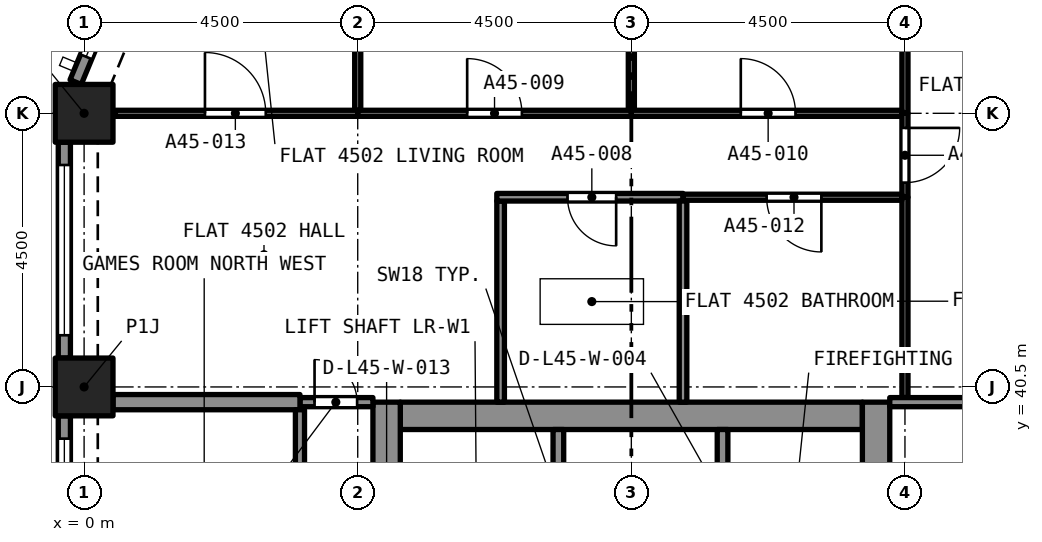
"""IFC4 building model, lengths in metres.
Left out: names, types, materials, properties, quantities, classifications, styles, units other than length and angle.
Written with IfcOpenShell. Run it as: python <this file> out.ifc"""

import sys

from ifc_helpers import new_model, si_unit, direction, frame, frame_2d, origin, origin_2d, place, context, subcontext, project, spatial, rectangle, extrude, element, fill, save


model = new_model("IFC4")
c1 = context("Model", 3, precision=1e-05, world=origin(), true_north=direction((0.0, 1.0)))
c2 = subcontext(c1, "Body", "Model", "MODEL_VIEW")
j1 = project(units=[si_unit("LENGTHUNIT", "METRE"), si_unit("PLANEANGLEUNIT", "RADIAN")], contexts=[c1])
p1 = place(None, origin())
s1 = spatial("IfcSite", under=j1, at=p1, CompositionType="ELEMENT")
p2 = place(p1, origin())
s2 = spatial("IfcBuilding", under=s1, at=p2, CompositionType="ELEMENT")
p3 = place(p2, frame((0.0, 0.0, 163.8)))
s3 = spatial("IfcBuildingStorey", under=s2, at=p3, CompositionType="ELEMENT", Elevation=163.8)
for number, where, z_axis, x_axis in (
    (1, (0.0, 40.5, 0.0), (0.0, 0.0, 1.0), (1.0, 0.0, 0.0)),
    (2, (0.0, 45.0, 0.0), (0.0, 0.0, 1.0), (1.0, 0.0, 0.0)),
):
    element("IfcColumn", number, at=place(p3, frame(where, z_axis=z_axis, x_axis=x_axis)), inside=s3, PredefinedType="COLUMN", context=c2, shape_type="SweptSolid", body=[
        extrude(rectangle(XDim=0.95, YDim=0.95, at=origin_2d()), origin(), (0.0, 0.0, 1.0), 4.4),
    ])
p4 = place(p3, frame((5.2, 40.025, 0.0), z_axis=(0.0, 0.0, 1.0), x_axis=(1.0, 0.0, 0.0)))
e3 = element("IfcWall", 3, at=p4, inside=s3, PredefinedType="SOLIDWALL", context=c2, shape_type="SweptSolid", body=[
    extrude(rectangle(XDim=7.6, YDim=0.45, at=frame_2d((3.8, 0.0))), origin(), (0.0, 0.0, 1.0), 4.4),
])
p5 = place(p3, frame((4.975, 27.25, 0.0), z_axis=(0.0, 0.0, 1.0), x_axis=(0.0, 1.0, 0.0)))
e4 = element("IfcWall", 4, at=p5, inside=s3, PredefinedType="SOLIDWALL", context=c2, shape_type="SweptSolid", body=[
    extrude(rectangle(XDim=13.0, YDim=0.45, at=frame_2d((6.5, 0.0))), origin(), (0.0, 0.0, 1.0), 4.4),
])
p6 = place(p5, frame((8.7, 0.0, 0.0)))
e5 = element("IfcOpeningElement", 5, at=p6, cuts=e4, PredefinedType="OPENING", context=c2, shape_type="SweptSolid", body=[
    extrude(rectangle(XDim=1.2, YDim=2.1, at=frame_2d((0.6, 1.05))), frame((0.0, 0.235, 0.0), z_axis=(0.0, -1.0, 0.0), x_axis=(1.0, 0.0, 0.0)), (0.0, 0.0, 1.0), 0.47),
])
p7 = place(p3, frame((13.025, 27.25, 0.0), z_axis=(0.0, 0.0, 1.0), x_axis=(0.0, 1.0, 0.0)))
e6 = element("IfcWall", 6, at=p7, inside=s3, PredefinedType="SOLIDWALL", context=c2, shape_type="SweptSolid", body=[
    extrude(rectangle(XDim=13.0, YDim=0.45, at=frame_2d((6.5, 0.0))), origin(), (0.0, 0.0, 1.0), 4.4),
])
p8 = place(p7, frame((10.85, 0.0, 0.0)))
e7 = element("IfcOpeningElement", 7, at=p8, cuts=e6, PredefinedType="OPENING", context=c2, shape_type="SweptSolid", body=[
    extrude(rectangle(XDim=1.1, YDim=2.1, at=frame_2d((0.55, 1.05))), frame((0.0, 0.235, 0.0), z_axis=(0.0, -1.0, 0.0), x_axis=(1.0, 0.0, 0.0)), (0.0, 0.0, 1.0), 0.47),
])
p9 = place(p7, frame((8.7, 0.0, 0.0)))
e8 = element("IfcOpeningElement", 8, at=p9, cuts=e6, PredefinedType="OPENING", context=c2, shape_type="SweptSolid", body=[
    extrude(rectangle(XDim=1.2, YDim=2.1, at=frame_2d((0.6, 1.05))), frame((0.0, 0.235, 0.0), z_axis=(0.0, -1.0, 0.0), x_axis=(1.0, 0.0, 0.0)), (0.0, 0.0, 1.0), 0.47),
])
p10 = place(p3, frame((-0.139, 45.513, 0.0), z_axis=(0.0, 0.0, 1.0), x_axis=(0.382680855588, 0.923880599843, 0.0)))
e9 = element("IfcWall", 9, at=p10, inside=s3, PredefinedType="SOLIDWALL", context=c2, shape_type="SweptSolid", body=[
    extrude(rectangle(XDim=2.403, YDim=0.2, at=frame_2d((1.201, 0.0))), origin(), (0.0, 0.0, 1.0), 4.4),
])
p11 = place(p10, frame((0.451, 0.0, 0.45)))
e10 = element("IfcOpeningElement", 10, at=p11, cuts=e9, PredefinedType="OPENING", context=c2, shape_type="SweptSolid", body=[
    extrude(rectangle(XDim=1.7, YDim=2.55, at=frame_2d((0.85, 1.275))), frame((0.0, 0.11, 0.0), z_axis=(0.0, -1.0, 0.0), x_axis=(1.0, 0.0, 0.0)), (0.0, 0.0, 1.0), 0.22),
])
p12 = place(p3, frame((-0.325, 40.975, 0.0), z_axis=(0.0, 0.0, 1.0), x_axis=(0.0, 1.0, 0.0)))
e11 = element("IfcWall", 11, at=p12, inside=s3, PredefinedType="SOLIDWALL", context=c2, shape_type="SweptSolid", body=[
    extrude(rectangle(XDim=3.55, YDim=0.2, at=frame_2d((1.775, 0.0))), origin(), (0.0, 0.0, 1.0), 4.4),
])
p13 = place(p12, frame((0.375, 0.0, 0.45)))
e12 = element("IfcOpeningElement", 12, at=p13, cuts=e11, PredefinedType="OPENING", context=c2, shape_type="SweptSolid", body=[
    extrude(rectangle(XDim=2.8, YDim=2.55, at=frame_2d((1.4, 1.275))), frame((0.0, 0.11, 0.0), z_axis=(0.0, -1.0, 0.0), x_axis=(1.0, 0.0, 0.0)), (0.0, 0.0, 1.0), 0.22),
])
p14 = place(p3, frame((-0.325, 36.475, 0.0), z_axis=(0.0, 0.0, 1.0), x_axis=(0.0, 1.0, 0.0)))
e13 = element("IfcWall", 13, at=p14, inside=s3, PredefinedType="SOLIDWALL", context=c2, shape_type="SweptSolid", body=[
    extrude(rectangle(XDim=3.55, YDim=0.2, at=frame_2d((1.775, 0.0))), origin(), (0.0, 0.0, 1.0), 4.4),
])
p15 = place(p14, frame((0.375, 0.0, 0.45)))
e14 = element("IfcOpeningElement", 14, at=p15, cuts=e13, PredefinedType="OPENING", context=c2, shape_type="SweptSolid", body=[
    extrude(rectangle(XDim=2.8, YDim=2.55, at=frame_2d((1.4, 1.275))), frame((0.0, 0.11, 0.0), z_axis=(0.0, -1.0, 0.0), x_axis=(1.0, 0.0, 0.0)), (0.0, 0.0, 1.0), 0.22),
])
p16 = place(p3, frame((6.85, 40.25, 0.0), z_axis=(0.0, 0.0, 1.0), x_axis=(0.0, 1.0, 0.0)))
e15 = element("IfcWall", 15, at=p16, inside=s3, PredefinedType="PARTITIONING", context=c2, shape_type="SweptSolid", body=[
    extrude(rectangle(XDim=3.308, YDim=0.125, at=frame_2d((1.654, 0.0))), origin(), (0.0, 0.0, 1.0), 4.1),
])
p17 = place(p3, frame((9.85, 43.62, 0.0), z_axis=(0.0, 0.0, 1.0), x_axis=(-1.0, 0.0, 0.0)))
e16 = element("IfcWall", 16, at=p17, inside=s3, PredefinedType="PARTITIONING", context=c2, shape_type="SweptSolid", body=[
    extrude(rectangle(XDim=3.063, YDim=0.125, at=frame_2d((1.531, 0.0))), origin(), (0.0, 0.0, 1.0), 4.1),
])
p18 = place(p17, frame((1.1, 0.0, 0.0)))
e17 = element("IfcOpeningElement", 17, at=p18, cuts=e16, PredefinedType="OPENING", context=c2, shape_type="SweptSolid", body=[
    extrude(rectangle(XDim=0.8, YDim=2.1, at=frame_2d((0.4, 1.05))), frame((0.0, 0.073, 0.0), z_axis=(0.0, -1.0, 0.0), x_axis=(1.0, 0.0, 0.0)), (0.0, 0.0, 1.0), 0.145),
])
p19 = place(p3, frame((9.85, 40.25, 0.0), z_axis=(0.0, 0.0, 1.0), x_axis=(0.0, 1.0, 0.0)))
e18 = element("IfcWall", 18, at=p19, inside=s3, PredefinedType="PARTITIONING", context=c2, shape_type="SweptSolid", body=[
    extrude(rectangle(XDim=3.308, YDim=0.125, at=frame_2d((1.654, 0.0))), origin(), (0.0, 0.0, 1.0), 4.1),
])
p20 = place(p3, frame((9.0, 45.05, 0.0), z_axis=(0.0, 0.0, 1.0), x_axis=(0.0, 1.0, 0.0)))
e19 = element("IfcWall", 19, at=p20, inside=s3, PredefinedType="PARTITIONING", context=c2, shape_type="SweptSolid", body=[
    extrude(rectangle(XDim=3.975, YDim=0.1, at=frame_2d((1.987, 0.0))), origin(), (0.0, 0.0, 1.0), 4.1),
])
p21 = place(p3, frame((4.5, 45.0, 0.0), z_axis=(0.0, 0.0, 1.0), x_axis=(1.0, 0.0, 0.0)))
e20 = element("IfcWall", 20, at=p21, inside=s3, PredefinedType="PARTITIONING", context=c2, shape_type="SweptSolid", body=[
    extrude(rectangle(XDim=4.5, YDim=0.1, at=frame_2d((2.25, 0.0))), origin(), (0.0, 0.0, 1.0), 4.1),
])
p22 = place(p21, frame((1.8, 0.0, 0.0)))
e21 = element("IfcOpeningElement", 21, at=p22, cuts=e20, PredefinedType="OPENING", context=c2, shape_type="SweptSolid", body=[
    extrude(rectangle(XDim=0.9, YDim=2.1, at=frame_2d((0.45, 1.05))), frame((0.0, 0.06, 0.0), z_axis=(0.0, -1.0, 0.0), x_axis=(1.0, 0.0, 0.0)), (0.0, 0.0, 1.0), 0.12),
])
p23 = place(p3, frame((4.5, 45.05, 0.0), z_axis=(0.0, 0.0, 1.0), x_axis=(0.0, 1.0, 0.0)))
e22 = element("IfcWall", 22, at=p23, inside=s3, PredefinedType="PARTITIONING", context=c2, shape_type="SweptSolid", body=[
    extrude(rectangle(XDim=3.936, YDim=0.1, at=frame_2d((1.968, 0.0))), origin(), (0.0, 0.0, 1.0), 4.1),
])
p24 = place(p3, frame((13.5, 45.0, 0.0), z_axis=(0.0, 0.0, 1.0), x_axis=(0.0, 1.0, 0.0)))
e23 = element("IfcWall", 23, at=p24, inside=s3, PredefinedType="PARTITIONING", context=c2, shape_type="SweptSolid", body=[
    extrude(rectangle(XDim=4.025, YDim=0.1, at=frame_2d((2.012, 0.0))), origin(), (0.0, 0.0, 1.0), 4.1),
])
p25 = place(p3, frame((9.0, 45.0, 0.0), z_axis=(0.0, 0.0, 1.0), x_axis=(1.0, 0.0, 0.0)))
e24 = element("IfcWall", 24, at=p25, inside=s3, PredefinedType="PARTITIONING", context=c2, shape_type="SweptSolid", body=[
    extrude(rectangle(XDim=4.45, YDim=0.1, at=frame_2d((2.225, 0.0))), origin(), (0.0, 0.0, 1.0), 4.1),
])
p26 = place(p25, frame((1.8, 0.0, 0.0)))
e25 = element("IfcOpeningElement", 25, at=p26, cuts=e24, PredefinedType="OPENING", context=c2, shape_type="SweptSolid", body=[
    extrude(rectangle(XDim=0.9, YDim=2.1, at=frame_2d((0.45, 1.05))), frame((0.0, 0.06, 0.0), z_axis=(0.0, -1.0, 0.0), x_axis=(1.0, 0.0, 0.0)), (0.0, 0.0, 1.0), 0.12),
])
p27 = place(p3, frame((13.5, 45.0, 0.0), z_axis=(0.0, 0.0, 1.0), x_axis=(0.0, -1.0, 0.0)))
e26 = element("IfcWall", 26, at=p27, inside=s3, PredefinedType="PARTITIONING", context=c2, shape_type="SweptSolid", body=[
    extrude(rectangle(XDim=1.38, YDim=0.1, at=frame_2d((0.69, 0.0))), origin(), (0.0, 0.0, 1.0), 4.1),
])
p28 = place(p27, frame((0.24, 0.0, 0.0)))
e27 = element("IfcOpeningElement", 27, at=p28, cuts=e26, PredefinedType="OPENING", context=c2, shape_type="SweptSolid", body=[
    extrude(rectangle(XDim=0.9, YDim=2.1, at=frame_2d((0.45, 1.05))), frame((0.0, 0.06, 0.0), z_axis=(0.0, -1.0, 0.0), x_axis=(1.0, 0.0, 0.0)), (0.0, 0.0, 1.0), 0.12),
])
p29 = place(p3, frame((13.5, 40.325, 0.0), z_axis=(0.0, 0.0, 1.0), x_axis=(0.0, 1.0, 0.0)))
e28 = element("IfcWall", 28, at=p29, inside=s3, PredefinedType="PARTITIONING", context=c2, shape_type="SweptSolid", body=[
    extrude(rectangle(XDim=3.295, YDim=0.1, at=frame_2d((1.647, 0.0))), origin(), (0.0, 0.0, 1.0), 4.1),
])
p30 = place(p3, frame((13.45, 43.62, 0.0), z_axis=(0.0, 0.0, 1.0), x_axis=(-1.0, 0.0, 0.0)))
e29 = element("IfcWall", 29, at=p30, inside=s3, PredefinedType="PARTITIONING", context=c2, shape_type="SweptSolid", body=[
    extrude(rectangle(XDim=3.6, YDim=0.1, at=frame_2d((1.8, 0.0))), origin(), (0.0, 0.0, 1.0), 4.1),
])
p31 = place(p30, frame((1.325, 0.0, 0.0)))
e30 = element("IfcOpeningElement", 30, at=p31, cuts=e29, PredefinedType="OPENING", context=c2, shape_type="SweptSolid", body=[
    extrude(rectangle(XDim=0.9, YDim=2.1, at=frame_2d((0.45, 1.05))), frame((0.0, 0.06, 0.0), z_axis=(0.0, -1.0, 0.0), x_axis=(1.0, 0.0, 0.0)), (0.0, 0.0, 1.0), 0.12),
])
p32 = place(p3, frame((0.514, 45.0, 0.0), z_axis=(0.0, 0.0, 1.0), x_axis=(1.0, 0.0, 0.0)))
e31 = element("IfcWall", 31, at=p32, inside=s3, PredefinedType="PARTITIONING", context=c2, shape_type="SweptSolid", body=[
    extrude(rectangle(XDim=3.986, YDim=0.1, at=frame_2d((1.993, 0.0))), origin(), (0.0, 0.0, 1.0), 4.1),
])
p33 = place(p32, frame((1.473, 0.0, 0.0)))
e32 = element("IfcOpeningElement", 32, at=p33, cuts=e31, PredefinedType="OPENING", context=c2, shape_type="SweptSolid", body=[
    extrude(rectangle(XDim=1.0, YDim=2.1, at=frame_2d((0.5, 1.05))), frame((0.0, 0.06, 0.0), z_axis=(0.0, -1.0, 0.0), x_axis=(1.0, 0.0, 0.0)), (0.0, 0.0, 1.0), 0.12),
])
p34 = place(p3, frame((3.55, 40.25, 0.0), z_axis=(0.0, 0.0, 1.0), x_axis=(1.0, 0.0, 0.0)))
e33 = element("IfcWall", 33, at=p34, inside=s3, PredefinedType="PARTITIONING", context=c2, shape_type="SweptSolid", body=[
    extrude(rectangle(XDim=1.2, YDim=0.15, at=frame_2d((0.6, 0.0))), origin(), (0.0, 0.0, 1.0), 4.1),
])
p35 = place(p34, frame((0.24, 0.0, 0.0)))
e34 = element("IfcOpeningElement", 34, at=p35, cuts=e33, PredefinedType="OPENING", context=c2, shape_type="SweptSolid", body=[
    extrude(rectangle(XDim=0.7, YDim=2.1, at=frame_2d((0.35, 1.05))), frame((0.0, 0.085, 0.0), z_axis=(0.0, -1.0, 0.0), x_axis=(1.0, 0.0, 0.0)), (0.0, 0.0, 1.0), 0.17),
])
p36 = place(p3, frame((0.475, 40.25, 0.0), z_axis=(0.0, 0.0, 1.0), x_axis=(1.0, 0.0, 0.0)))
e35 = element("IfcWall", 35, at=p36, inside=s3, PredefinedType="PARTITIONING", context=c2, shape_type="SweptSolid", body=[
    extrude(rectangle(XDim=3.075, YDim=0.25, at=frame_2d((1.538, 0.0))), origin(), (0.0, 0.0, 1.0), 4.1),
])
p37 = place(p3, frame((13.25, 40.25, 0.0), z_axis=(0.0, 0.0, 1.0), x_axis=(1.0, 0.0, 0.0)))
e36 = element("IfcWall", 36, at=p37, inside=s3, PredefinedType="PARTITIONING", context=c2, shape_type="SweptSolid", body=[
    extrude(rectangle(XDim=1.675, YDim=0.15, at=frame_2d((0.837, 0.0))), origin(), (0.0, 0.0, 1.0), 4.1),
])
p38 = place(p3, frame((3.55, 36.0, 0.0), z_axis=(0.0, 0.0, 1.0), x_axis=(0.0, 1.0, 0.0)))
e37 = element("IfcWall", 37, at=p38, inside=s3, PredefinedType="PARTITIONING", context=c2, shape_type="SweptSolid", body=[
    extrude(rectangle(XDim=4.125, YDim=0.15, at=frame_2d((2.062, 0.0))), origin(), (0.0, 0.0, 1.0), 4.1),
])
p39 = place(p38, frame((1.625, 0.0, 0.0)))
e38 = element("IfcOpeningElement", 38, at=p39, cuts=e37, PredefinedType="OPENING", context=c2, shape_type="SweptSolid", body=[
    extrude(rectangle(XDim=1.0, YDim=2.1, at=frame_2d((0.5, 1.05))), frame((0.0, 0.085, 0.0), z_axis=(0.0, -1.0, 0.0), x_axis=(1.0, 0.0, 0.0)), (0.0, 0.0, 1.0), 0.17),
])
p40 = place(p3, frame((7.8, 37.5, 0.0), z_axis=(0.0, 0.0, 1.0), x_axis=(0.0, 1.0, 0.0)))
e39 = element("IfcWall", 39, at=p40, inside=s3, PredefinedType="SOLIDWALL", context=c2, shape_type="SweptSolid", body=[
    extrude(rectangle(XDim=2.3, YDim=0.175, at=frame_2d((1.15, 0.0))), origin(), (0.0, 0.0, 1.0), 4.1),
])
p41 = place(p3, frame((10.5, 37.5, 0.0), z_axis=(0.0, 0.0, 1.0), x_axis=(0.0, 1.0, 0.0)))
e40 = element("IfcWall", 40, at=p41, inside=s3, PredefinedType="SOLIDWALL", context=c2, shape_type="SweptSolid", body=[
    extrude(rectangle(XDim=2.3, YDim=0.175, at=frame_2d((1.15, 0.0))), origin(), (0.0, 0.0, 1.0), 4.1),
])
p42 = place(p41, frame((0.65, 0.0, 0.0)))
e41 = element("IfcOpeningElement", 41, at=p42, cuts=e40, PredefinedType="OPENING", context=c2, shape_type="SweptSolid", body=[
    extrude(rectangle(XDim=1.0, YDim=2.1, at=frame_2d((0.5, 1.05))), frame((0.0, 0.097, 0.0), z_axis=(0.0, -1.0, 0.0), x_axis=(1.0, 0.0, 0.0)), (0.0, 0.0, 1.0), 0.195),
])
p43 = place(p11, origin())
e42 = element("IfcWindow", 42, at=p43, inside=s3, PartitioningType="SINGLE_PANEL", PredefinedType="WINDOW", context=c2, shape_type="SweptSolid", body=[
    extrude(rectangle(XDim=1.7, YDim=2.55, at=frame_2d((0.85, 1.275))), frame((0.0, 0.03, 0.0), z_axis=(0.0, -1.0, 0.0), x_axis=(1.0, 0.0, 0.0)), (0.0, 0.0, 1.0), 0.06),
])
fill(e10, e42)
p44 = place(p13, origin())
e43 = element("IfcWindow", 43, at=p44, inside=s3, PartitioningType="SINGLE_PANEL", PredefinedType="WINDOW", context=c2, shape_type="SweptSolid", body=[
    extrude(rectangle(XDim=2.8, YDim=2.55, at=frame_2d((1.4, 1.275))), frame((0.0, 0.03, 0.0), z_axis=(0.0, -1.0, 0.0), x_axis=(1.0, 0.0, 0.0)), (0.0, 0.0, 1.0), 0.06),
])
fill(e12, e43)
p45 = place(p15, origin())
e44 = element("IfcWindow", 44, at=p45, inside=s3, PartitioningType="SINGLE_PANEL", PredefinedType="WINDOW", context=c2, shape_type="SweptSolid", body=[
    extrude(rectangle(XDim=2.8, YDim=2.55, at=frame_2d((1.4, 1.275))), frame((0.0, 0.03, 0.0), z_axis=(0.0, -1.0, 0.0), x_axis=(1.0, 0.0, 0.0)), (0.0, 0.0, 1.0), 0.06),
])
fill(e14, e44)
p46 = place(p18, origin())
e45 = element("IfcDoor", 45, at=p46, inside=s3, OperationType="SINGLE_SWING_LEFT", PredefinedType="DOOR", context=c2, shape_type="SweptSolid", body=[
    extrude(rectangle(XDim=0.8, YDim=2.1, at=frame_2d((0.4, 1.05))), frame((0.0, 0.025, 0.0), z_axis=(0.0, -1.0, 0.0), x_axis=(1.0, 0.0, 0.0)), (0.0, 0.0, 1.0), 0.05),
])
fill(e17, e45)
p47 = place(p22, origin())
e46 = element("IfcDoor", 46, at=p47, inside=s3, OperationType="SINGLE_SWING_LEFT", PredefinedType="DOOR", context=c2, shape_type="SweptSolid", body=[
    extrude(rectangle(XDim=0.9, YDim=2.1, at=frame_2d((0.45, 1.05))), frame((0.0, 0.025, 0.0), z_axis=(0.0, -1.0, 0.0), x_axis=(1.0, 0.0, 0.0)), (0.0, 0.0, 1.0), 0.05),
])
fill(e21, e46)
p48 = place(p26, origin())
e47 = element("IfcDoor", 47, at=p48, inside=s3, OperationType="SINGLE_SWING_RIGHT", PredefinedType="DOOR", context=c2, shape_type="SweptSolid", body=[
    extrude(rectangle(XDim=0.9, YDim=2.1, at=frame_2d((0.45, 1.05))), frame((0.0, 0.025, 0.0), z_axis=(0.0, -1.0, 0.0), x_axis=(1.0, 0.0, 0.0)), (0.0, 0.0, 1.0), 0.05),
])
fill(e25, e47)
p49 = place(p28, origin())
e48 = element("IfcDoor", 48, at=p49, inside=s3, OperationType="SINGLE_SWING_LEFT", PredefinedType="DOOR", context=c2, shape_type="SweptSolid", body=[
    extrude(rectangle(XDim=0.9, YDim=2.1, at=frame_2d((0.45, 1.05))), frame((0.0, 0.025, 0.0), z_axis=(0.0, -1.0, 0.0), x_axis=(1.0, 0.0, 0.0)), (0.0, 0.0, 1.0), 0.05),
])
fill(e27, e48)
p50 = place(p31, origin())
e49 = element("IfcDoor", 49, at=p50, inside=s3, OperationType="SINGLE_SWING_LEFT", PredefinedType="DOOR", context=c2, shape_type="SweptSolid", body=[
    extrude(rectangle(XDim=0.9, YDim=2.1, at=frame_2d((0.45, 1.05))), frame((0.0, 0.025, 0.0), z_axis=(0.0, -1.0, 0.0), x_axis=(1.0, 0.0, 0.0)), (0.0, 0.0, 1.0), 0.05),
])
fill(e30, e49)
p51 = place(p33, origin())
e50 = element("IfcDoor", 50, at=p51, inside=s3, OperationType="SINGLE_SWING_LEFT", PredefinedType="DOOR", context=c2, shape_type="SweptSolid", body=[
    extrude(rectangle(XDim=1.0, YDim=2.1, at=frame_2d((0.5, 1.05))), frame((0.0, 0.025, 0.0), z_axis=(0.0, -1.0, 0.0), x_axis=(1.0, 0.0, 0.0)), (0.0, 0.0, 1.0), 0.05),
])
fill(e32, e50)
p52 = place(p35, origin())
e51 = element("IfcDoor", 51, at=p52, inside=s3, OperationType="SINGLE_SWING_LEFT", PredefinedType="DOOR", context=c2, shape_type="SweptSolid", body=[
    extrude(rectangle(XDim=0.7, YDim=2.1, at=frame_2d((0.35, 1.05))), frame((0.0, 0.025, 0.0), z_axis=(0.0, -1.0, 0.0), x_axis=(1.0, 0.0, 0.0)), (0.0, 0.0, 1.0), 0.05),
])
fill(e34, e51)
save(model, sys.argv[1])
